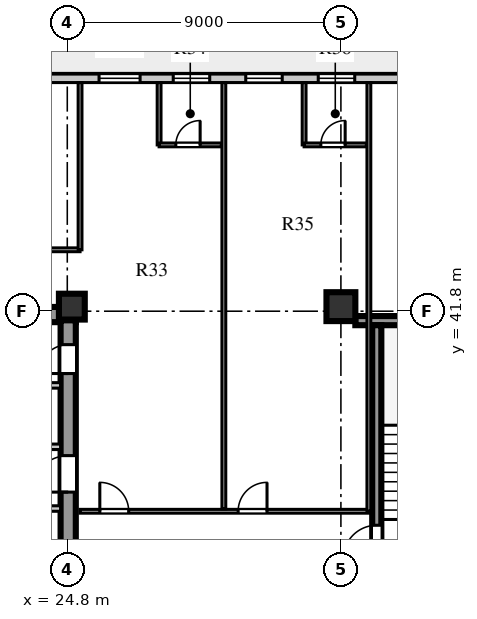
"""IFC4 building model, lengths in metres.
Left out: names, types, materials, properties, quantities, classifications, styles, units other than length and angle.
Written with IfcOpenShell. Run it as: python <this file> out.ifc"""

import sys

from ifc_helpers import new_model, si_unit, direction, frame, frame_2d, origin, origin_2d, place, context, subcontext, project, spatial, rectangle, extrude, element, fill, save


model = new_model("IFC4")
c1 = context("Model", 3, precision=1e-05, world=origin(), true_north=direction((0.0, 1.0)))
c2 = subcontext(c1, "Body", "Model", "MODEL_VIEW")
j1 = project(units=[si_unit("LENGTHUNIT", "METRE"), si_unit("PLANEANGLEUNIT", "RADIAN")], contexts=[c1])
p1 = place(None, origin())
s1 = spatial("IfcSite", under=j1, at=p1, CompositionType="ELEMENT")
p2 = place(p1, origin())
s2 = spatial("IfcBuilding", under=s1, at=p2, CompositionType="ELEMENT")
p3 = place(p2, frame((0.0, 0.0, 165.6)))
s3 = spatial("IfcBuildingStorey", under=s2, at=p3, CompositionType="ELEMENT", Elevation=165.6)
p4 = place(p3, frame((15.4, 41.69, 0.0), z_axis=(0.0, 0.0, 1.0), x_axis=(1.0, 0.0, 0.0)))
e1 = element("IfcWall", 1, at=p4, inside=s3, PredefinedType="SHEAR", context=c2, shape_type="SweptSolid", body=[
    extrude(rectangle(XDim=9.68, YDim=0.5, at=frame_2d((4.84, 0.0))), origin(), (0.0, 0.0, 1.0), 3.6),
])
p5 = place(p3, frame((24.83, 15.74, 0.0), z_axis=(0.0, 0.0, 1.0), x_axis=(0.0, 1.0, 0.0)))
e2 = element("IfcWall", 2, at=p5, inside=s3, PredefinedType="SHEAR", context=c2, shape_type="SweptSolid", body=[
    extrude(rectangle(XDim=25.76, YDim=0.5, at=frame_2d((12.88, 0.0))), origin(), (0.0, 0.0, 1.0), 3.6),
])
p6 = place(p5, frame((1.61, 0.0, 0.0)))
e3 = element("IfcOpeningElement", 3, at=p6, cuts=e2, PredefinedType="OPENING", context=c2, shape_type="SweptSolid", body=[
    extrude(rectangle(XDim=1.2, YDim=2.1, at=frame_2d((0.6, 1.05))), frame((0.0, 0.26, 0.0), z_axis=(0.0, -1.0, 0.0), x_axis=(1.0, 0.0, 0.0)), (0.0, 0.0, 1.0), 0.52),
])
p7 = place(p5, frame((6.78, 0.0, 0.0)))
e4 = element("IfcOpeningElement", 4, at=p7, cuts=e2, PredefinedType="OPENING", context=c2, shape_type="SweptSolid", body=[
    extrude(rectangle(XDim=0.85, YDim=2.06, at=frame_2d((0.425, 1.03))), frame((0.0, 0.26, 0.0), z_axis=(0.0, -1.0, 0.0), x_axis=(1.0, 0.0, 0.0)), (0.0, 0.0, 1.0), 0.52),
])
p8 = place(p5, frame((12.11, 0.0, 0.0)))
e5 = element("IfcOpeningElement", 5, at=p8, cuts=e2, PredefinedType="OPENING", context=c2, shape_type="SweptSolid", body=[
    extrude(rectangle(XDim=1.5, YDim=2.12, at=frame_2d((0.75, 1.06))), frame((0.0, 0.26, 0.0), z_axis=(0.0, -1.0, 0.0), x_axis=(1.0, 0.0, 0.0)), (0.0, 0.0, 1.0), 0.52),
])
p9 = place(p5, frame((20.11, 0.0, 0.0)))
e6 = element("IfcOpeningElement", 6, at=p9, cuts=e2, PredefinedType="OPENING", context=c2, shape_type="SweptSolid", body=[
    extrude(rectangle(XDim=1.2, YDim=2.12, at=frame_2d((0.6, 1.06))), frame((0.0, 0.26, 0.0), z_axis=(0.0, -1.0, 0.0), x_axis=(1.0, 0.0, 0.0)), (0.0, 0.0, 1.0), 0.52),
])
p10 = place(p5, frame((24.01, 0.0, 0.0)))
e7 = element("IfcOpeningElement", 7, at=p10, cuts=e2, PredefinedType="OPENING", context=c2, shape_type="SweptSolid", body=[
    extrude(rectangle(XDim=0.95, YDim=2.1, at=frame_2d((0.475, 1.05))), frame((0.0, 0.26, 0.0), z_axis=(0.0, -1.0, 0.0), x_axis=(1.0, 0.0, 0.0)), (0.0, 0.0, 1.0), 0.52),
])
p11 = place(p3, frame((34.275, 41.49, 0.0), z_axis=(0.0, 0.0, 1.0), x_axis=(1.0, 0.0, 0.0)))
e8 = element("IfcWall", 8, at=p11, inside=s3, PredefinedType="SHEAR", context=c2, shape_type="SweptSolid", body=[
    extrude(rectangle(XDim=4.595, YDim=0.3, at=frame_2d((2.298, 0.0))), origin(), (0.0, 0.0, 1.0), 3.6),
])
p12 = place(p3, frame((34.98, 33.31, 0.0), z_axis=(0.0, 0.0, 1.0), x_axis=(0.0, 1.0, 0.0)))
e9 = element("IfcWall", 9, at=p12, inside=s3, PredefinedType="SHEAR", context=c2, shape_type="SweptSolid", body=[
    extrude(rectangle(XDim=8.03, YDim=0.3, at=frame_2d((4.015, 0.0))), origin(), (0.0, 0.0, 1.0), 3.6),
])
p13 = place(p12, frame((0.35, 0.0, 0.0)))
e10 = element("IfcOpeningElement", 10, at=p13, cuts=e9, PredefinedType="OPENING", context=c2, shape_type="SweptSolid", body=[
    extrude(rectangle(XDim=1.1, YDim=2.1, at=frame_2d((0.55, 1.05))), frame((0.0, 0.16, 0.0), z_axis=(0.0, -1.0, 0.0), x_axis=(1.0, 0.0, 0.0)), (0.0, 0.0, 1.0), 0.32),
])
p14 = place(p3, frame((24.95, 41.95, 0.0), z_axis=(0.0, 0.0, 1.0), x_axis=(1.0, 0.0, 0.0)))
e11 = element("IfcColumn", 11, at=p14, inside=s3, PredefinedType="COLUMN", context=c2, shape_type="SweptSolid", body=[
    extrude(rectangle(XDim=0.85, YDim=0.85, at=origin_2d()), origin(), (0.0, 0.0, 1.0), 3.6),
])
p15 = place(p3, frame((33.8, 41.95, 0.0), z_axis=(0.0, 0.0, 1.0), x_axis=(1.0, 0.0, 0.0)))
e12 = element("IfcColumn", 12, at=p15, inside=s3, PredefinedType="COLUMN", context=c2, shape_type="SweptSolid", body=[
    extrude(rectangle(XDim=0.95, YDim=0.95, at=origin_2d()), origin(), (0.0, 0.0, 1.0), 3.6),
])
p16 = place(p3, frame((45.55, 49.46, 0.0), z_axis=(0.0, 0.0, 1.0), x_axis=(-1.0, 0.0, 0.0)))
e13 = element("IfcWall", 13, at=p16, inside=s3, PredefinedType="STANDARD", context=c2, shape_type="SweptSolid", body=[
    extrude(rectangle(XDim=32.5, YDim=0.28, at=frame_2d((16.25, 0.0))), origin(), (0.0, 0.0, 1.0), 3.6),
])
p17 = place(p16, frame((30.55, 0.0, 0.0)))
e14 = element("IfcOpeningElement", 14, at=p17, cuts=e13, PredefinedType="OPENING", context=c2, shape_type="SweptSolid", body=[
    extrude(rectangle(XDim=1.0, YDim=2.05, at=frame_2d((0.5, 1.025))), frame((0.0, 0.15, 0.0), z_axis=(0.0, -1.0, 0.0), x_axis=(1.0, 0.0, 0.0)), (0.0, 0.0, 1.0), 0.3),
])
p18 = place(p16, frame((24.42, 0.0, 0.8)))
e15 = element("IfcOpeningElement", 15, at=p18, cuts=e13, PredefinedType="OPENING", context=c2, shape_type="SweptSolid", body=[
    extrude(rectangle(XDim=2.1, YDim=1.95, at=frame_2d((1.05, 0.975))), frame((0.0, 0.15, 0.0), z_axis=(0.0, -1.0, 0.0), x_axis=(1.0, 0.0, 0.0)), (0.0, 0.0, 1.0), 0.3),
])
p19 = place(p16, frame((18.355, 0.0, 0.8)))
e16 = element("IfcOpeningElement", 16, at=p19, cuts=e13, PredefinedType="OPENING", context=c2, shape_type="SweptSolid", body=[
    extrude(rectangle(XDim=1.35, YDim=1.9, at=frame_2d((0.675, 0.95))), frame((0.0, 0.15, 0.0), z_axis=(0.0, -1.0, 0.0), x_axis=(1.0, 0.0, 0.0)), (0.0, 0.0, 1.0), 0.3),
])
p20 = place(p16, frame((16.065, 0.0, 0.8)))
e17 = element("IfcOpeningElement", 17, at=p20, cuts=e13, PredefinedType="OPENING", context=c2, shape_type="SweptSolid", body=[
    extrude(rectangle(XDim=1.2, YDim=1.75, at=frame_2d((0.6, 0.875))), frame((0.0, 0.15, 0.0), z_axis=(0.0, -1.0, 0.0), x_axis=(1.0, 0.0, 0.0)), (0.0, 0.0, 1.0), 0.3),
])
p21 = place(p16, frame((13.68, 0.0, 0.8)))
e18 = element("IfcOpeningElement", 18, at=p21, cuts=e13, PredefinedType="OPENING", context=c2, shape_type="SweptSolid", body=[
    extrude(rectangle(XDim=1.2, YDim=1.75, at=frame_2d((0.6, 0.875))), frame((0.0, 0.15, 0.0), z_axis=(0.0, -1.0, 0.0), x_axis=(1.0, 0.0, 0.0)), (0.0, 0.0, 1.0), 0.3),
])
p22 = place(p16, frame((11.295, 0.0, 0.8)))
e19 = element("IfcOpeningElement", 19, at=p22, cuts=e13, PredefinedType="OPENING", context=c2, shape_type="SweptSolid", body=[
    extrude(rectangle(XDim=1.2, YDim=1.75, at=frame_2d((0.6, 0.875))), frame((0.0, 0.15, 0.0), z_axis=(0.0, -1.0, 0.0), x_axis=(1.0, 0.0, 0.0)), (0.0, 0.0, 1.0), 0.3),
])
p23 = place(p16, frame((6.88, 0.0, 0.8)))
e20 = element("IfcOpeningElement", 20, at=p23, cuts=e13, PredefinedType="OPENING", context=c2, shape_type="SweptSolid", body=[
    extrude(rectangle(XDim=1.8, YDim=2.0, at=frame_2d((0.9, 1.0))), frame((0.0, 0.15, 0.0), z_axis=(0.0, -1.0, 0.0), x_axis=(1.0, 0.0, 0.0)), (0.0, 0.0, 1.0), 0.3),
])
p24 = place(p16, frame((1.67, 0.0, 0.8)))
e21 = element("IfcOpeningElement", 21, at=p24, cuts=e13, PredefinedType="OPENING", context=c2, shape_type="SweptSolid", body=[
    extrude(rectangle(XDim=1.5, YDim=2.0, at=frame_2d((0.75, 1.0))), frame((0.0, 0.15, 0.0), z_axis=(0.0, -1.0, 0.0), x_axis=(1.0, 0.0, 0.0)), (0.0, 0.0, 1.0), 0.3),
])
p25 = place(p3, frame((22.02, 35.31, 0.0), z_axis=(0.0, 0.0, 1.0), x_axis=(1.0, 0.0, 0.0)))
e22 = element("IfcWall", 22, at=p25, inside=s3, PredefinedType="SOLIDWALL", context=c2, shape_type="SweptSolid", body=[
    extrude(rectangle(XDim=2.56, YDim=0.18, at=frame_2d((1.28, 0.0))), origin(), (0.0, 0.0, 1.0), 3.6),
])
p26 = place(p25, frame((0.55, 0.0, 0.0)))
e23 = element("IfcOpeningElement", 23, at=p26, cuts=e22, PredefinedType="OPENING", context=c2, shape_type="SweptSolid", body=[
    extrude(rectangle(XDim=1.0, YDim=2.1, at=frame_2d((0.5, 1.05))), frame((0.0, 0.1, 0.0), z_axis=(0.0, -1.0, 0.0), x_axis=(1.0, 0.0, 0.0)), (0.0, 0.0, 1.0), 0.2),
])
p27 = place(p3, frame((19.64, 37.34, 0.0), z_axis=(0.0, 0.0, 1.0), x_axis=(1.0, 0.0, 0.0)))
e24 = element("IfcWall", 24, at=p27, inside=s3, PredefinedType="SOLIDWALL", context=c2, shape_type="SweptSolid", body=[
    extrude(rectangle(XDim=4.94, YDim=0.18, at=frame_2d((2.47, 0.0))), origin(), (0.0, 0.0, 1.0), 3.6),
])
p28 = place(p27, frame((0.45, 0.0, 0.0)))
e25 = element("IfcOpeningElement", 25, at=p28, cuts=e24, PredefinedType="OPENING", context=c2, shape_type="SweptSolid", body=[
    extrude(rectangle(XDim=1.0, YDim=2.1, at=frame_2d((0.5, 1.05))), frame((0.0, 0.1, 0.0), z_axis=(0.0, -1.0, 0.0), x_axis=(1.0, 0.0, 0.0)), (0.0, 0.0, 1.0), 0.2),
])
p29 = place(p27, frame((2.5, 0.0, 0.0)))
e26 = element("IfcOpeningElement", 26, at=p29, cuts=e24, PredefinedType="OPENING", context=c2, shape_type="SweptSolid", body=[
    extrude(rectangle(XDim=1.0, YDim=2.1, at=frame_2d((0.5, 1.05))), frame((0.0, 0.1, 0.0), z_axis=(0.0, -1.0, 0.0), x_axis=(1.0, 0.0, 0.0)), (0.0, 0.0, 1.0), 0.2),
])
p30 = place(p3, frame((19.64, 39.36, 0.0), z_axis=(0.0, 0.0, 1.0), x_axis=(1.0, 0.0, 0.0)))
e27 = element("IfcWall", 27, at=p30, inside=s3, PredefinedType="SOLIDWALL", context=c2, shape_type="SweptSolid", body=[
    extrude(rectangle(XDim=4.94, YDim=0.18, at=frame_2d((2.47, 0.0))), origin(), (0.0, 0.0, 1.0), 3.6),
])
p31 = place(p3, frame((25.22, 35.22, 0.0), z_axis=(0.0, 0.0, 1.0), x_axis=(1.0, 0.0, 0.0)))
e28 = element("IfcWall", 28, at=p31, inside=s3, PredefinedType="PLUMBINGWALL", context=c2, shape_type="SweptSolid", body=[
    extrude(rectangle(XDim=9.5, YDim=0.125, at=frame_2d((4.75, 0.0))), origin(), (0.0, 0.0, 1.0), 3.6),
])
p32 = place(p31, frame((0.65, 0.0, 0.0)))
e29 = element("IfcOpeningElement", 29, at=p32, cuts=e28, PredefinedType="OPENING", context=c2, shape_type="SweptSolid", body=[
    extrude(rectangle(XDim=0.95, YDim=2.1, at=frame_2d((0.475, 1.05))), frame((0.0, 0.073, 0.0), z_axis=(0.0, -1.0, 0.0), x_axis=(1.0, 0.0, 0.0)), (0.0, 0.0, 1.0), 0.145),
])
p33 = place(p31, frame((5.2, 0.0, 0.0)))
e30 = element("IfcOpeningElement", 30, at=p33, cuts=e28, PredefinedType="OPENING", context=c2, shape_type="SweptSolid", body=[
    extrude(rectangle(XDim=0.95, YDim=2.1, at=frame_2d((0.475, 1.05))), frame((0.0, 0.073, 0.0), z_axis=(0.0, -1.0, 0.0), x_axis=(1.0, 0.0, 0.0)), (0.0, 0.0, 1.0), 0.145),
])
p34 = place(p3, frame((13.39, 43.82, 0.0), z_axis=(0.0, 0.0, 1.0), x_axis=(1.0, 0.0, 0.0)))
e31 = element("IfcWall", 31, at=p34, inside=s3, PredefinedType="PLUMBINGWALL", context=c2, shape_type="SweptSolid", body=[
    extrude(rectangle(XDim=11.83, YDim=0.125, at=frame_2d((5.915, 0.0))), origin(), (0.0, 0.0, 1.0), 3.6),
])
p35 = place(p34, frame((4.76, 0.0, 0.0)))
e32 = element("IfcOpeningElement", 32, at=p35, cuts=e31, PredefinedType="OPENING", context=c2, shape_type="SweptSolid", body=[
    extrude(rectangle(XDim=1.0, YDim=2.08, at=frame_2d((0.5, 1.04))), frame((0.0, 0.073, 0.0), z_axis=(0.0, -1.0, 0.0), x_axis=(1.0, 0.0, 0.0)), (0.0, 0.0, 1.0), 0.145),
])
p36 = place(p3, frame((25.22, 43.82, 0.0), z_axis=(0.0, 0.0, 1.0), x_axis=(0.0, 1.0, 0.0)))
e33 = element("IfcWall", 33, at=p36, inside=s3, PredefinedType="PLUMBINGWALL", context=c2, shape_type="SweptSolid", body=[
    extrude(rectangle(XDim=5.5, YDim=0.125, at=frame_2d((2.75, 0.0))), origin(), (0.0, 0.0, 1.0), 3.15),
])
p37 = place(p3, frame((34.72, 35.22, 0.0), z_axis=(0.0, 0.0, 1.0), x_axis=(0.0, 1.0, 0.0)))
e34 = element("IfcWall", 34, at=p37, inside=s3, PredefinedType="PLUMBINGWALL", context=c2, shape_type="SweptSolid", body=[
    extrude(rectangle(XDim=14.1, YDim=0.125, at=frame_2d((7.05, 0.0))), origin(), (0.0, 0.0, 1.0), 3.6),
])
p38 = place(p3, frame((29.95, 35.3, 0.0), z_axis=(0.0, 0.0, 1.0), x_axis=(0.0, 1.0, 0.0)))
e35 = element("IfcWall", 35, at=p38, inside=s3, PredefinedType="PLUMBINGWALL", context=c2, shape_type="SweptSolid", body=[
    extrude(rectangle(XDim=14.02, YDim=0.125, at=frame_2d((7.01, 0.0))), origin(), (0.0, 0.0, 1.0), 3.6),
])
p39 = place(p3, frame((27.82, 47.27, 0.0), z_axis=(0.0, 0.0, 1.0), x_axis=(0.0, 1.0, 0.0)))
e36 = element("IfcWall", 36, at=p39, inside=s3, PredefinedType="PLUMBINGWALL", context=c2, shape_type="SweptSolid", body=[
    extrude(rectangle(XDim=2.05, YDim=0.125, at=frame_2d((1.025, 0.0))), origin(), (0.0, 0.0, 1.0), 3.6),
])
p40 = place(p3, frame((27.82, 47.27, 0.0), z_axis=(0.0, 0.0, 1.0), x_axis=(1.0, 0.0, 0.0)))
e37 = element("IfcWall", 37, at=p40, inside=s3, PredefinedType="PLUMBINGWALL", context=c2, shape_type="SweptSolid", body=[
    extrude(rectangle(XDim=2.05, YDim=0.125, at=frame_2d((1.025, 0.0))), origin(), (0.0, 0.0, 1.0), 3.6),
])
p41 = place(p40, frame((0.55, 0.0, 0.0)))
e38 = element("IfcOpeningElement", 38, at=p41, cuts=e37, PredefinedType="OPENING", context=c2, shape_type="SweptSolid", body=[
    extrude(rectangle(XDim=0.8, YDim=2.05, at=frame_2d((0.4, 1.025))), frame((0.0, 0.073, 0.0), z_axis=(0.0, -1.0, 0.0), x_axis=(1.0, 0.0, 0.0)), (0.0, 0.0, 1.0), 0.145),
])
p42 = place(p3, frame((32.59, 47.27, 0.0), z_axis=(0.0, 0.0, 1.0), x_axis=(0.0, 1.0, 0.0)))
e39 = element("IfcWall", 39, at=p42, inside=s3, PredefinedType="PLUMBINGWALL", context=c2, shape_type="SweptSolid", body=[
    extrude(rectangle(XDim=2.05, YDim=0.125, at=frame_2d((1.025, 0.0))), origin(), (0.0, 0.0, 1.0), 3.6),
])
p43 = place(p3, frame((32.59, 47.27, 0.0), z_axis=(0.0, 0.0, 1.0), x_axis=(1.0, 0.0, 0.0)))
e40 = element("IfcWall", 40, at=p43, inside=s3, PredefinedType="PLUMBINGWALL", context=c2, shape_type="SweptSolid", body=[
    extrude(rectangle(XDim=2.05, YDim=0.125, at=frame_2d((1.025, 0.0))), origin(), (0.0, 0.0, 1.0), 3.6),
])
p44 = place(p43, frame((0.55, 0.0, 0.0)))
e41 = element("IfcOpeningElement", 41, at=p44, cuts=e40, PredefinedType="OPENING", context=c2, shape_type="SweptSolid", body=[
    extrude(rectangle(XDim=0.8, YDim=2.05, at=frame_2d((0.4, 1.025))), frame((0.0, 0.073, 0.0), z_axis=(0.0, -1.0, 0.0), x_axis=(1.0, 0.0, 0.0)), (0.0, 0.0, 1.0), 0.145),
])
p45 = place(p19, origin())
e42 = element("IfcWindow", 42, at=p45, inside=s3, PartitioningType="SINGLE_PANEL", PredefinedType="WINDOW", context=c2, shape_type="SweptSolid", body=[
    extrude(rectangle(XDim=1.35, YDim=1.9, at=frame_2d((0.675, 0.95))), frame((0.0, 0.03, 0.0), z_axis=(0.0, -1.0, 0.0), x_axis=(1.0, 0.0, 0.0)), (0.0, 0.0, 1.0), 0.06),
])
fill(e16, e42)
p46 = place(p20, origin())
e43 = element("IfcWindow", 43, at=p46, inside=s3, PartitioningType="SINGLE_PANEL", PredefinedType="WINDOW", context=c2, shape_type="SweptSolid", body=[
    extrude(rectangle(XDim=1.2, YDim=1.75, at=frame_2d((0.6, 0.875))), frame((0.0, 0.03, 0.0), z_axis=(0.0, -1.0, 0.0), x_axis=(1.0, 0.0, 0.0)), (0.0, 0.0, 1.0), 0.06),
])
fill(e17, e43)
p47 = place(p21, origin())
e44 = element("IfcWindow", 44, at=p47, inside=s3, PartitioningType="SINGLE_PANEL", PredefinedType="WINDOW", context=c2, shape_type="SweptSolid", body=[
    extrude(rectangle(XDim=1.2, YDim=1.75, at=frame_2d((0.6, 0.875))), frame((0.0, 0.03, 0.0), z_axis=(0.0, -1.0, 0.0), x_axis=(1.0, 0.0, 0.0)), (0.0, 0.0, 1.0), 0.06),
])
fill(e18, e44)
p48 = place(p22, origin())
e45 = element("IfcWindow", 45, at=p48, inside=s3, PartitioningType="SINGLE_PANEL", PredefinedType="WINDOW", context=c2, shape_type="SweptSolid", body=[
    extrude(rectangle(XDim=1.2, YDim=1.75, at=frame_2d((0.6, 0.875))), frame((0.0, 0.03, 0.0), z_axis=(0.0, -1.0, 0.0), x_axis=(1.0, 0.0, 0.0)), (0.0, 0.0, 1.0), 0.06),
])
fill(e19, e45)
p49 = place(p9, frame((1.2, 0.0, 0.0), z_axis=(0.0, 0.0, 1.0), x_axis=(-1.0, 0.0, 0.0)))
e46 = element("IfcDoor", 46, at=p49, inside=s3, OperationType="SINGLE_SWING_RIGHT", PredefinedType="DOOR", context=c2, shape_type="SweptSolid", body=[
    extrude(rectangle(XDim=1.2, YDim=2.12, at=frame_2d((0.6, 1.06))), frame((0.0, 0.025, 0.0), z_axis=(0.0, -1.0, 0.0), x_axis=(1.0, 0.0, 0.0)), (0.0, 0.0, 1.0), 0.05),
])
fill(e6, e46)
p50 = place(p10, frame((0.95, 0.0, 0.0), z_axis=(0.0, 0.0, 1.0), x_axis=(-1.0, 0.0, 0.0)))
e47 = element("IfcDoor", 47, at=p50, inside=s3, OperationType="SINGLE_SWING_RIGHT", PredefinedType="DOOR", context=c2, shape_type="SweptSolid", body=[
    extrude(rectangle(XDim=0.95, YDim=2.1, at=frame_2d((0.475, 1.05))), frame((0.0, 0.025, 0.0), z_axis=(0.0, -1.0, 0.0), x_axis=(1.0, 0.0, 0.0)), (0.0, 0.0, 1.0), 0.05),
])
fill(e7, e47)
p51 = place(p13, origin())
e48 = element("IfcDoor", 48, at=p51, inside=s3, OperationType="SINGLE_SWING_LEFT", PredefinedType="DOOR", context=c2, shape_type="SweptSolid", body=[
    extrude(rectangle(XDim=1.1, YDim=2.1, at=frame_2d((0.55, 1.05))), frame((0.0, 0.025, 0.0), z_axis=(0.0, -1.0, 0.0), x_axis=(1.0, 0.0, 0.0)), (0.0, 0.0, 1.0), 0.05),
])
fill(e10, e48)
p52 = place(p32, origin())
e49 = element("IfcDoor", 49, at=p52, inside=s3, OperationType="SINGLE_SWING_LEFT", PredefinedType="DOOR", context=c2, shape_type="SweptSolid", body=[
    extrude(rectangle(XDim=0.95, YDim=2.1, at=frame_2d((0.475, 1.05))), frame((0.0, 0.025, 0.0), z_axis=(0.0, -1.0, 0.0), x_axis=(1.0, 0.0, 0.0)), (0.0, 0.0, 1.0), 0.05),
])
fill(e29, e49)
p53 = place(p41, frame((0.8, 0.0, 0.0), z_axis=(0.0, 0.0, 1.0), x_axis=(-1.0, 0.0, 0.0)))
e50 = element("IfcDoor", 50, at=p53, inside=s3, OperationType="SINGLE_SWING_LEFT", PredefinedType="DOOR", context=c2, shape_type="SweptSolid", body=[
    extrude(rectangle(XDim=0.8, YDim=2.05, at=frame_2d((0.4, 1.025))), frame((0.0, 0.025, 0.0), z_axis=(0.0, -1.0, 0.0), x_axis=(1.0, 0.0, 0.0)), (0.0, 0.0, 1.0), 0.05),
])
fill(e38, e50)
p54 = place(p33, origin())
e51 = element("IfcDoor", 51, at=p54, inside=s3, OperationType="SINGLE_SWING_RIGHT", PredefinedType="DOOR", context=c2, shape_type="SweptSolid", body=[
    extrude(rectangle(XDim=0.95, YDim=2.1, at=frame_2d((0.475, 1.05))), frame((0.0, 0.025, 0.0), z_axis=(0.0, -1.0, 0.0), x_axis=(1.0, 0.0, 0.0)), (0.0, 0.0, 1.0), 0.05),
])
fill(e30, e51)
p55 = place(p44, frame((0.8, 0.0, 0.0), z_axis=(0.0, 0.0, 1.0), x_axis=(-1.0, 0.0, 0.0)))
e52 = element("IfcDoor", 52, at=p55, inside=s3, OperationType="SINGLE_SWING_LEFT", PredefinedType="DOOR", context=c2, shape_type="SweptSolid", body=[
    extrude(rectangle(XDim=0.8, YDim=2.05, at=frame_2d((0.4, 1.025))), frame((0.0, 0.025, 0.0), z_axis=(0.0, -1.0, 0.0), x_axis=(1.0, 0.0, 0.0)), (0.0, 0.0, 1.0), 0.05),
])
fill(e41, e52)
save(model, sys.argv[1])
